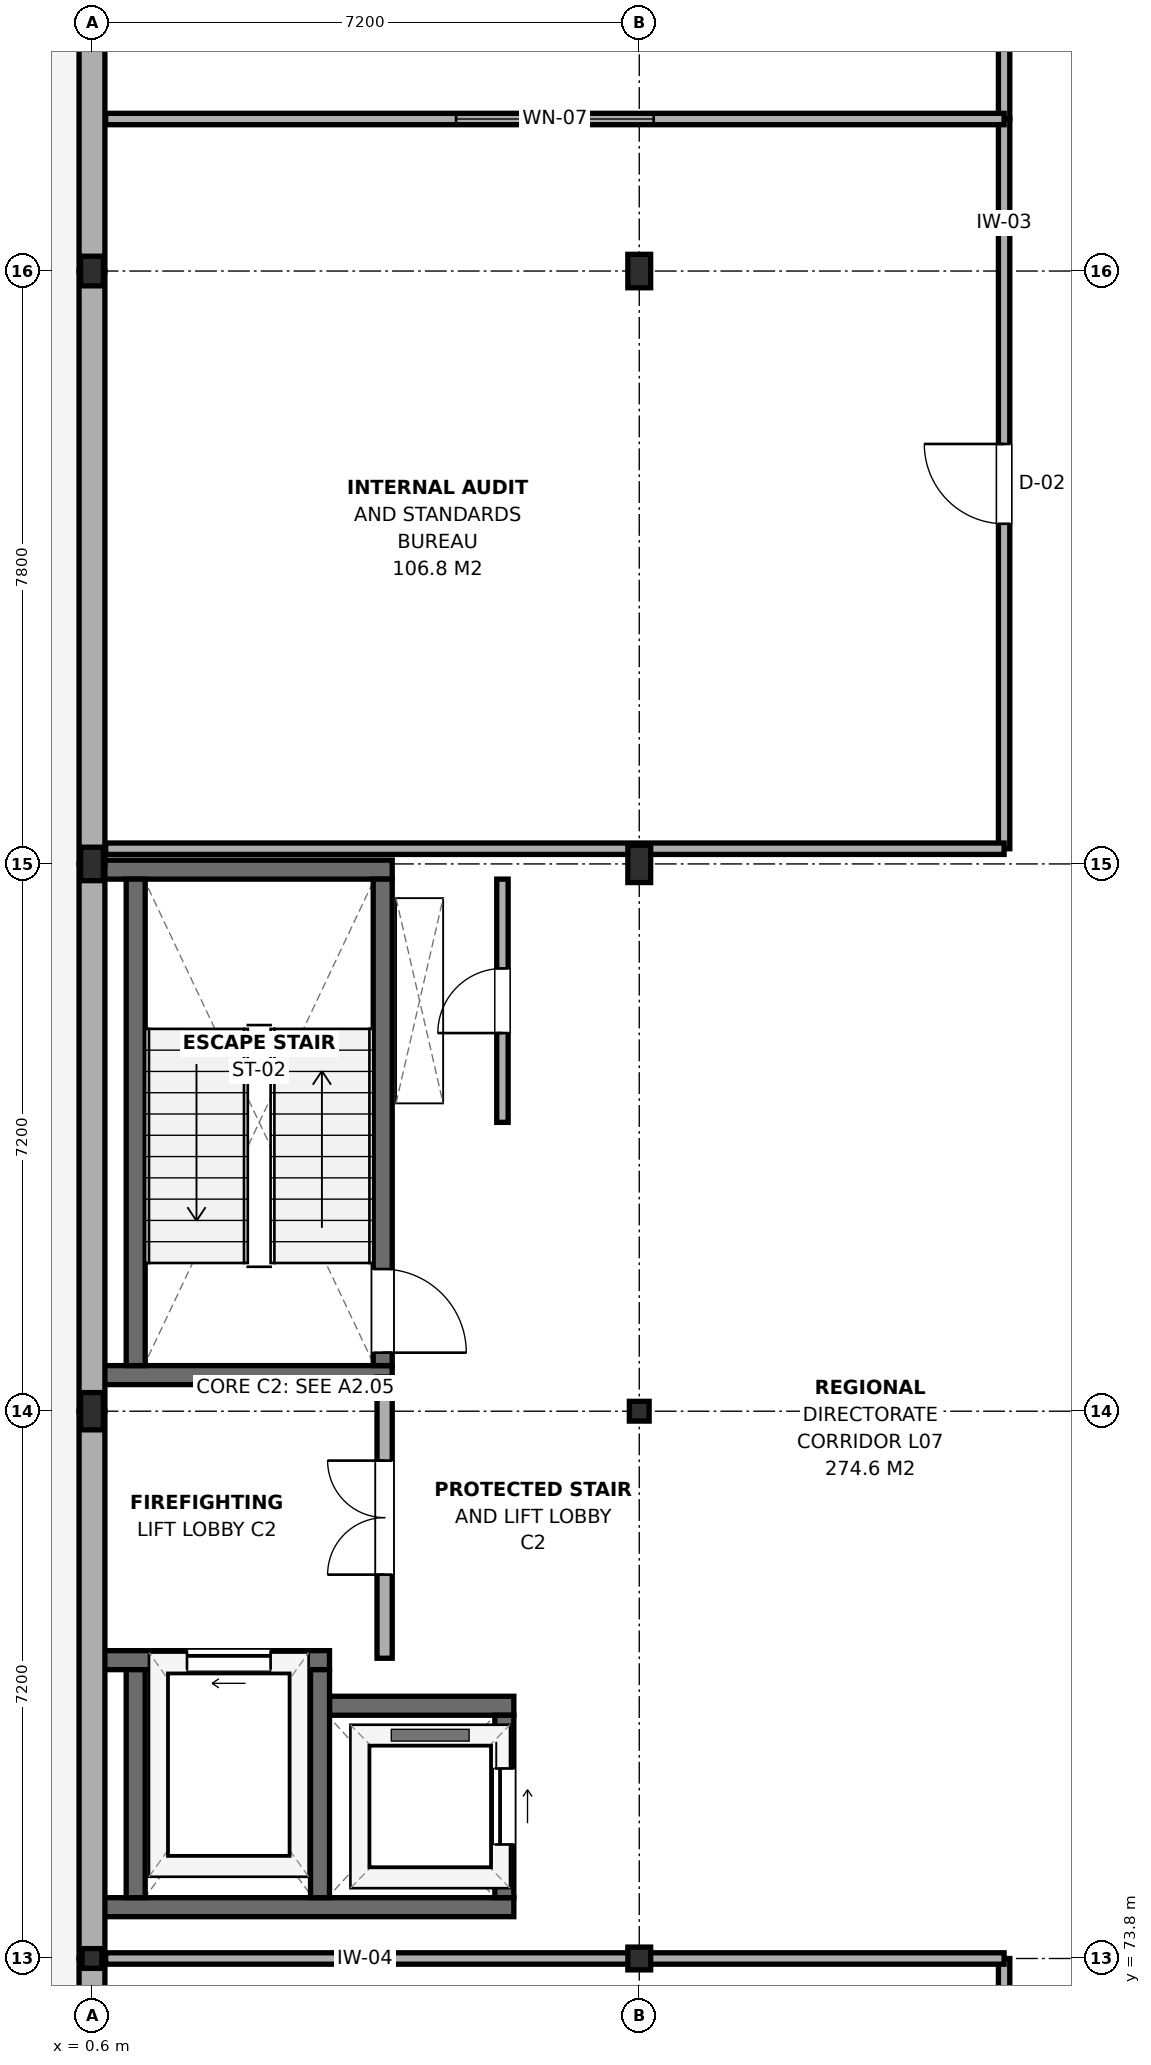
"""IFC4 building model, lengths in metres.
Left out: names, types, materials, properties, quantities, classifications, styles, units other than length and angle.
Written with IfcOpenShell. Run it as: python <this file> out.ifc"""

import sys

from ifc_helpers import new_model, si_unit, direction, frame, frame_2d, origin, origin_2d, place, context, subcontext, project, spatial, rectangle, i_section, extrude, element, fill, save


model = new_model("IFC4")
c1 = context("Model", 3, precision=1e-05, world=origin(), true_north=direction((0.0, 1.0)))
c2 = subcontext(c1, "Body", "Model", "MODEL_VIEW")
j1 = project(units=[si_unit("LENGTHUNIT", "METRE"), si_unit("PLANEANGLEUNIT", "RADIAN")], contexts=[c1])
p1 = place(None, origin())
s1 = spatial("IfcSite", under=j1, at=p1, CompositionType="ELEMENT")
p2 = place(p1, origin())
s2 = spatial("IfcBuilding", under=s1, at=p2, CompositionType="ELEMENT")
p3 = place(p2, frame((0.0, 0.0, 28.8)))
s3 = spatial("IfcBuildingStorey", under=s2, at=p3, CompositionType="ELEMENT", Elevation=28.8)
p4 = place(p3, frame((0.6, 73.8, 0.0), z_axis=(0.0, 0.0, 1.0), x_axis=(1.0, 0.0, 0.0)))
e1 = element("IfcColumn", 1, at=p4, inside=s3, PredefinedType="COLUMN", context=c2, shape_type="SweptSolid", body=[
    extrude(i_section(OverallWidth=0.26, OverallDepth=0.26, WebThickness=0.01, FlangeThickness=0.018, FilletRadius=0.024, at=origin_2d()), origin(), (0.0, 0.0, 1.0), 3.9),
])
p5 = place(p3, frame((0.6, 81.0, 0.0), z_axis=(0.0, 0.0, 1.0), x_axis=(1.0, 0.0, 0.0)))
e2 = element("IfcColumn", 2, at=p5, inside=s3, PredefinedType="COLUMN", context=c2, shape_type="SweptSolid", body=[
    extrude(i_section(OverallWidth=0.3, OverallDepth=0.49, WebThickness=0.012, FlangeThickness=0.023, FilletRadius=0.027, at=origin_2d()), origin(), (0.0, 0.0, 1.0), 3.9),
])
p6 = place(p3, frame((0.6, 88.2, 0.0), z_axis=(0.0, 0.0, 1.0), x_axis=(1.0, 0.0, 0.0)))
e3 = element("IfcColumn", 3, at=p6, inside=s3, PredefinedType="COLUMN", context=c2, shape_type="SweptSolid", body=[
    extrude(i_section(OverallWidth=0.3, OverallDepth=0.44, WebThickness=0.011, FlangeThickness=0.021, FilletRadius=0.027, at=origin_2d()), origin(), (0.0, 0.0, 1.0), 3.9),
])
p7 = place(p3, frame((0.6, 96.0, 0.0), z_axis=(0.0, 0.0, 1.0), x_axis=(1.0, 0.0, 0.0)))
e4 = element("IfcColumn", 4, at=p7, inside=s3, PredefinedType="COLUMN", context=c2, shape_type="SweptSolid", body=[
    extrude(i_section(OverallWidth=0.3, OverallDepth=0.39, WebThickness=0.011, FlangeThickness=0.019, FilletRadius=0.027, at=origin_2d()), origin(), (0.0, 0.0, 1.0), 3.9),
])
p8 = place(p3, frame((7.8, 73.8, 0.0), z_axis=(0.0, 0.0, 1.0), x_axis=(1.0, 0.0, 0.0)))
e5 = element("IfcColumn", 5, at=p8, inside=s3, PredefinedType="COLUMN", context=c2, shape_type="SweptSolid", body=[
    extrude(i_section(OverallWidth=0.3, OverallDepth=0.3, WebThickness=0.011, FlangeThickness=0.019, FilletRadius=0.027, at=origin_2d()), origin(), (0.0, 0.0, 1.0), 3.9),
])
p9 = place(p3, frame((7.8, 81.0, 0.0), z_axis=(0.0, 0.0, 1.0), x_axis=(1.0, 0.0, 0.0)))
e6 = element("IfcColumn", 6, at=p9, inside=s3, PredefinedType="COLUMN", context=c2, shape_type="SweptSolid", body=[
    extrude(i_section(OverallWidth=0.26, OverallDepth=0.26, WebThickness=0.01, FlangeThickness=0.018, FilletRadius=0.024, at=origin_2d()), origin(), (0.0, 0.0, 1.0), 3.9),
])
p10 = place(p3, frame((7.8, 88.2, 0.0), z_axis=(0.0, 0.0, 1.0), x_axis=(1.0, 0.0, 0.0)))
e7 = element("IfcColumn", 7, at=p10, inside=s3, PredefinedType="COLUMN", context=c2, shape_type="SweptSolid", body=[
    extrude(i_section(OverallWidth=0.3, OverallDepth=0.49, WebThickness=0.012, FlangeThickness=0.023, FilletRadius=0.027, at=origin_2d()), origin(), (0.0, 0.0, 1.0), 3.9),
])
p11 = place(p3, frame((7.8, 96.0, 0.0), z_axis=(0.0, 0.0, 1.0), x_axis=(1.0, 0.0, 0.0)))
e8 = element("IfcColumn", 8, at=p11, inside=s3, PredefinedType="COLUMN", context=c2, shape_type="SweptSolid", body=[
    extrude(i_section(OverallWidth=0.3, OverallDepth=0.44, WebThickness=0.011, FlangeThickness=0.021, FilletRadius=0.027, at=origin_2d()), origin(), (0.0, 0.0, 1.0), 3.9),
])
for number, where, z_axis, x_axis in (
    (9, (0.75, 81.475, 0.0), (0.0, 0.0, 1.0), (1.0, 0.0, 0.0)),
    (10, (0.75, 88.125, 0.0), (0.0, 0.0, 1.0), (1.0, 0.0, 0.0)),
):
    element("IfcWall", number, at=place(p3, frame(where, z_axis=z_axis, x_axis=x_axis)), inside=s3, PredefinedType="SHEAR", context=c2, shape_type="SweptSolid", body=[
        extrude(rectangle(XDim=3.8, YDim=0.25, at=frame_2d((1.9, 0.0))), origin(), (0.0, 0.0, 1.0), 3.72),
    ])
p12 = place(p3, frame((1.175, 81.6, 0.0), z_axis=(0.0, 0.0, 1.0), x_axis=(0.0, 1.0, 0.0)))
e11 = element("IfcWall", 11, at=p12, inside=s3, PredefinedType="SHEAR", context=c2, shape_type="SweptSolid", body=[
    extrude(rectangle(XDim=6.4, YDim=0.25, at=frame_2d((3.2, 0.0))), origin(), (0.0, 0.0, 1.0), 3.72),
])
p13 = place(p3, frame((4.425, 81.6, 0.0), z_axis=(0.0, 0.0, 1.0), x_axis=(0.0, 1.0, 0.0)))
e12 = element("IfcWall", 12, at=p13, inside=s3, PredefinedType="SHEAR", context=c2, shape_type="SweptSolid", body=[
    extrude(rectangle(XDim=6.4, YDim=0.25, at=frame_2d((3.2, 0.0))), origin(), (0.0, 0.0, 1.0), 3.72),
])
p14 = place(p13, frame((0.17, 0.0, 0.0)))
e13 = element("IfcOpeningElement", 13, at=p14, cuts=e12, PredefinedType="OPENING", context=c2, shape_type="SweptSolid", body=[
    extrude(rectangle(XDim=1.1, YDim=2.15, at=frame_2d((0.55, 1.075))), frame((0.0, 0.14, 0.0), z_axis=(0.0, -1.0, 0.0), x_axis=(1.0, 0.0, 0.0)), (0.0, 0.0, 1.0), 0.28),
])
p15 = place(p3, frame((0.75, 74.475, 0.0), z_axis=(0.0, 0.0, 1.0), x_axis=(1.0, 0.0, 0.0)))
e14 = element("IfcWall", 14, at=p15, inside=s3, PredefinedType="SHEAR", context=c2, shape_type="SweptSolid", body=[
    extrude(rectangle(XDim=5.4, YDim=0.25, at=frame_2d((2.7, 0.0))), origin(), (0.0, 0.0, 1.0), 3.72),
])
p16 = place(p3, frame((0.75, 77.725, 0.0), z_axis=(0.0, 0.0, 1.0), x_axis=(1.0, 0.0, 0.0)))
e15 = element("IfcWall", 15, at=p16, inside=s3, PredefinedType="SHEAR", context=c2, shape_type="SweptSolid", body=[
    extrude(rectangle(XDim=2.975, YDim=0.25, at=frame_2d((1.488, 0.0))), origin(), (0.0, 0.0, 1.0), 3.72),
])
p17 = place(p16, frame((1.1, 0.0, 0.0)))
e16 = element("IfcOpeningElement", 16, at=p17, cuts=e15, PredefinedType="OPENING", context=c2, shape_type="SweptSolid", body=[
    extrude(rectangle(XDim=1.1, YDim=2.15, at=frame_2d((0.55, 1.075))), frame((0.0, 0.14, 0.0), z_axis=(0.0, -1.0, 0.0), x_axis=(1.0, 0.0, 0.0)), (0.0, 0.0, 1.0), 0.28),
])
p18 = place(p3, frame((3.725, 77.125, 0.0), z_axis=(0.0, 0.0, 1.0), x_axis=(1.0, 0.0, 0.0)))
e17 = element("IfcWall", 17, at=p18, inside=s3, PredefinedType="SHEAR", context=c2, shape_type="SweptSolid", body=[
    extrude(rectangle(XDim=2.425, YDim=0.25, at=frame_2d((1.212, 0.0))), origin(), (0.0, 0.0, 1.0), 3.72),
])
for number, where, z_axis, x_axis in (
    (18, (1.175, 74.6, 0.0), (0.0, 0.0, 1.0), (0.0, 1.0, 0.0)),
    (19, (3.6, 74.6, 0.0), (0.0, 0.0, 1.0), (0.0, 1.0, 0.0)),
):
    element("IfcWall", number, at=place(p3, frame(where, z_axis=z_axis, x_axis=x_axis)), inside=s3, PredefinedType="SHEAR", context=c2, shape_type="SweptSolid", body=[
        extrude(rectangle(XDim=3.0, YDim=0.25, at=frame_2d((1.5, 0.0))), origin(), (0.0, 0.0, 1.0), 3.72),
    ])
p19 = place(p3, frame((6.025, 74.6, 0.0), z_axis=(0.0, 0.0, 1.0), x_axis=(0.0, 1.0, 0.0)))
e20 = element("IfcWall", 20, at=p19, inside=s3, PredefinedType="SHEAR", context=c2, shape_type="SweptSolid", body=[
    extrude(rectangle(XDim=2.4, YDim=0.25, at=frame_2d((1.2, 0.0))), origin(), (0.0, 0.0, 1.0), 3.72),
])
p20 = place(p19, frame((0.7, 0.0, 0.0)))
e21 = element("IfcOpeningElement", 21, at=p20, cuts=e20, PredefinedType="OPENING", context=c2, shape_type="SweptSolid", body=[
    extrude(rectangle(XDim=1.0, YDim=2.15, at=frame_2d((0.5, 1.075))), frame((0.0, 0.14, 0.0), z_axis=(0.0, -1.0, 0.0), x_axis=(1.0, 0.0, 0.0)), (0.0, 0.0, 1.0), 0.28),
])
p21 = place(p3, frame((0.6, 66.6, 0.0), z_axis=(0.0, 0.0, 1.0), x_axis=(0.0, 1.0, 0.0)))
e22 = element("IfcWall", 22, at=p21, inside=s3, PredefinedType="SOLIDWALL", context=c2, shape_type="SweptSolid", body=[
    extrude(rectangle(XDim=7.2, YDim=0.34, at=frame_2d((3.6, 0.0))), origin(), (0.0, 0.0, 1.0), 3.115),
])
p22 = place(p21, frame((2.6, 0.0, 0.9)))
e23 = element("IfcOpeningElement", 23, at=p22, cuts=e22, PredefinedType="OPENING", context=c2, shape_type="SweptSolid", body=[
    extrude(rectangle(XDim=2.0, YDim=1.8, at=frame_2d((1.0, 0.9))), frame((0.0, 0.185, 0.0), z_axis=(0.0, -1.0, 0.0), x_axis=(1.0, 0.0, 0.0)), (0.0, 0.0, 1.0), 0.37),
])
for number, where, z_axis, x_axis in (
    (24, (0.6, 73.8, 0.0), (0.0, 0.0, 1.0), (0.0, 1.0, 0.0)),
    (25, (0.6, 81.0, 0.0), (0.0, 0.0, 1.0), (0.0, 1.0, 0.0)),
):
    element("IfcWall", number, at=place(p3, frame(where, z_axis=z_axis, x_axis=x_axis)), inside=s3, PredefinedType="SOLIDWALL", context=c2, shape_type="SweptSolid", body=[
        extrude(rectangle(XDim=7.2, YDim=0.34, at=frame_2d((3.6, 0.0))), origin(), (0.0, 0.0, 1.0), 3.115),
    ])
p23 = place(p3, frame((0.6, 88.2, 0.0), z_axis=(0.0, 0.0, 1.0), x_axis=(0.0, 1.0, 0.0)))
e26 = element("IfcWall", 26, at=p23, inside=s3, PredefinedType="SOLIDWALL", context=c2, shape_type="SweptSolid", body=[
    extrude(rectangle(XDim=7.8, YDim=0.34, at=frame_2d((3.9, 0.0))), origin(), (0.0, 0.0, 1.0), 3.165),
])
p24 = place(p3, frame((0.6, 96.0, 0.0), z_axis=(0.0, 0.0, 1.0), x_axis=(0.0, 1.0, 0.0)))
e27 = element("IfcWall", 27, at=p24, inside=s3, PredefinedType="SOLIDWALL", context=c2, shape_type="SweptSolid", body=[
    extrude(rectangle(XDim=8.57, YDim=0.34, at=frame_2d((4.285, 0.0))), origin(), (0.0, 0.0, 1.0), 3.215),
])
p25 = place(p3, frame((4.45, 77.75, 0.0), z_axis=(0.0, 0.0, 1.0), x_axis=(0.0, 1.0, 0.0)))
e28 = element("IfcWall", 28, at=p25, inside=s3, PredefinedType="PARTITIONING", context=c2, shape_type="SweptSolid", body=[
    extrude(rectangle(XDim=3.7, YDim=0.2, at=frame_2d((1.85, 0.0))), origin(), (0.0, 0.0, 1.0), 3.265),
])
p26 = place(p25, frame((1.1, 0.0, 0.0)))
e29 = element("IfcOpeningElement", 29, at=p26, cuts=e28, PredefinedType="OPENING", context=c2, shape_type="SweptSolid", body=[
    extrude(rectangle(XDim=1.5, YDim=2.15, at=frame_2d((0.75, 1.075))), frame((0.0, 0.115, 0.0), z_axis=(0.0, -1.0, 0.0), x_axis=(1.0, 0.0, 0.0)), (0.0, 0.0, 1.0), 0.23),
])
p27 = place(p3, frame((6.0, 84.8, 0.0), z_axis=(0.0, 0.0, 1.0), x_axis=(0.0, 1.0, 0.0)))
e30 = element("IfcWall", 30, at=p27, inside=s3, PredefinedType="PARTITIONING", context=c2, shape_type="SweptSolid", body=[
    extrude(rectangle(XDim=3.2, YDim=0.15, at=frame_2d((1.6, 0.0))), origin(), (0.0, 0.0, 1.0), 3.115),
])
p28 = place(p27, frame((1.175, 0.0, 0.0)))
e31 = element("IfcOpeningElement", 31, at=p28, cuts=e30, PredefinedType="OPENING", context=c2, shape_type="SweptSolid", body=[
    extrude(rectangle(XDim=0.85, YDim=2.1, at=frame_2d((0.425, 1.05))), frame((0.0, 0.09, 0.0), z_axis=(0.0, -1.0, 0.0), x_axis=(1.0, 0.0, 0.0)), (0.0, 0.0, 1.0), 0.18),
])
p29 = place(p3, frame((12.6, 58.8, 0.0), z_axis=(0.0, 0.0, 1.0), x_axis=(0.0, 1.0, 0.0)))
e32 = element("IfcWall", 32, at=p29, inside=s3, PredefinedType="PARTITIONING", context=c2, shape_type="SweptSolid", body=[
    extrude(rectangle(XDim=15.0, YDim=0.15, at=frame_2d((7.5, 0.0))), origin(), (0.0, 0.0, 1.0), 3.165),
])
p30 = place(p29, frame((7.0, 0.0, 0.0)))
e33 = element("IfcOpeningElement", 33, at=p30, cuts=e32, PredefinedType="OPENING", context=c2, shape_type="SweptSolid", body=[
    extrude(rectangle(XDim=1.0, YDim=2.15, at=frame_2d((0.5, 1.075))), frame((0.0, 0.09, 0.0), z_axis=(0.0, -1.0, 0.0), x_axis=(1.0, 0.0, 0.0)), (0.0, 0.0, 1.0), 0.18),
])
p31 = place(p29, frame((9.5, 0.0, 0.95)))
e34 = element("IfcOpeningElement", 34, at=p31, cuts=e32, PredefinedType="OPENING", context=c2, shape_type="SweptSolid", body=[
    extrude(rectangle(XDim=2.6, YDim=1.5, at=frame_2d((1.3, 0.75))), frame((0.0, 0.09, 0.0), z_axis=(0.0, -1.0, 0.0), x_axis=(1.0, 0.0, 0.0)), (0.0, 0.0, 1.0), 0.18),
])
p32 = place(p3, frame((0.78, 73.8, 0.0), z_axis=(0.0, 0.0, 1.0), x_axis=(1.0, 0.0, 0.0)))
e35 = element("IfcWall", 35, at=p32, inside=s3, PredefinedType="PARTITIONING", context=c2, shape_type="SweptSolid", body=[
    extrude(rectangle(XDim=11.82, YDim=0.15, at=frame_2d((5.91, 0.0))), origin(), (0.0, 0.0, 1.0), 3.115),
])
p33 = place(p3, frame((12.6, 88.4, 0.0), z_axis=(0.0, 0.0, 1.0), x_axis=(0.0, 1.0, 0.0)))
e36 = element("IfcWall", 36, at=p33, inside=s3, PredefinedType="PARTITIONING", context=c2, shape_type="SweptSolid", body=[
    extrude(rectangle(XDim=9.6, YDim=0.15, at=frame_2d((4.8, 0.0))), origin(), (0.0, 0.0, 1.0), 3.165),
])
p34 = place(p33, frame((4.275, 0.0, 0.0)))
e37 = element("IfcOpeningElement", 37, at=p34, cuts=e36, PredefinedType="OPENING", context=c2, shape_type="SweptSolid", body=[
    extrude(rectangle(XDim=1.05, YDim=2.15, at=frame_2d((0.525, 1.075))), frame((0.0, 0.09, 0.0), z_axis=(0.0, -1.0, 0.0), x_axis=(1.0, 0.0, 0.0)), (0.0, 0.0, 1.0), 0.18),
])
p35 = place(p3, frame((0.78, 88.4, 0.0), z_axis=(0.0, 0.0, 1.0), x_axis=(1.0, 0.0, 0.0)))
e38 = element("IfcWall", 38, at=p35, inside=s3, PredefinedType="PARTITIONING", context=c2, shape_type="SweptSolid", body=[
    extrude(rectangle(XDim=11.82, YDim=0.15, at=frame_2d((5.91, 0.0))), origin(), (0.0, 0.0, 1.0), 3.115),
])
p36 = place(p3, frame((12.6, 98.0, 0.0), z_axis=(0.0, 0.0, 1.0), x_axis=(0.0, 1.0, 0.0)))
e39 = element("IfcWall", 39, at=p36, inside=s3, PredefinedType="PARTITIONING", context=c2, shape_type="SweptSolid", body=[
    extrude(rectangle(XDim=4.04, YDim=0.15, at=frame_2d((2.02, 0.0))), origin(), (0.0, 0.0, 1.0), 3.415),
])
p37 = place(p36, frame((1.545, 0.0, 0.0)))
e40 = element("IfcOpeningElement", 40, at=p37, cuts=e39, PredefinedType="OPENING", context=c2, shape_type="SweptSolid", body=[
    extrude(rectangle(XDim=0.95, YDim=2.15, at=frame_2d((0.475, 1.075))), frame((0.0, 0.09, 0.0), z_axis=(0.0, -1.0, 0.0), x_axis=(1.0, 0.0, 0.0)), (0.0, 0.0, 1.0), 0.18),
])
p38 = place(p3, frame((0.78, 98.0, 0.0), z_axis=(0.0, 0.0, 1.0), x_axis=(1.0, 0.0, 0.0)))
e41 = element("IfcWall", 41, at=p38, inside=s3, PredefinedType="PARTITIONING", context=c2, shape_type="SweptSolid", body=[
    extrude(rectangle(XDim=11.82, YDim=0.15, at=frame_2d((5.91, 0.0))), origin(), (0.0, 0.0, 1.0), 3.125),
])
p39 = place(p38, frame((4.61, 0.0, 0.95)))
e42 = element("IfcOpeningElement", 42, at=p39, cuts=e41, PredefinedType="OPENING", context=c2, shape_type="SweptSolid", body=[
    extrude(rectangle(XDim=2.6, YDim=1.5, at=frame_2d((1.3, 0.75))), frame((0.0, 0.09, 0.0), z_axis=(0.0, -1.0, 0.0), x_axis=(1.0, 0.0, 0.0)), (0.0, 0.0, 1.0), 0.18),
])
p40 = place(p14, frame((1.1, 0.0, 0.0), z_axis=(0.0, 0.0, 1.0), x_axis=(-1.0, 0.0, 0.0)))
e43 = element("IfcDoor", 43, at=p40, inside=s3, OperationType="SINGLE_SWING_RIGHT", PredefinedType="DOOR", context=c2, shape_type="SweptSolid", body=[
    extrude(rectangle(XDim=1.1, YDim=2.15, at=frame_2d((0.55, 1.075))), frame((0.0, 0.025, 0.0), z_axis=(0.0, -1.0, 0.0), x_axis=(1.0, 0.0, 0.0)), (0.0, 0.0, 1.0), 0.05),
])
fill(e13, e43)
p41 = place(p17, origin())
e44 = element("IfcDoor", 44, at=p41, inside=s3, OperationType="SLIDING_TO_LEFT", PredefinedType="DOOR", context=c2, shape_type="SweptSolid", body=[
    extrude(rectangle(XDim=1.1, YDim=2.15, at=frame_2d((0.55, 1.075))), frame((0.0, 0.025, 0.0), z_axis=(0.0, -1.0, 0.0), x_axis=(1.0, 0.0, 0.0)), (0.0, 0.0, 1.0), 0.05),
])
fill(e16, e44)
p42 = place(p20, frame((1.0, 0.0, 0.0), z_axis=(0.0, 0.0, 1.0), x_axis=(-1.0, 0.0, 0.0)))
e45 = element("IfcDoor", 45, at=p42, inside=s3, OperationType="SLIDING_TO_RIGHT", PredefinedType="DOOR", context=c2, shape_type="SweptSolid", body=[
    extrude(rectangle(XDim=1.0, YDim=2.15, at=frame_2d((0.5, 1.075))), frame((0.0, 0.025, 0.0), z_axis=(0.0, -1.0, 0.0), x_axis=(1.0, 0.0, 0.0)), (0.0, 0.0, 1.0), 0.05),
])
fill(e21, e45)
p43 = place(p26, origin())
e46 = element("IfcDoor", 46, at=p43, inside=s3, OperationType="DOUBLE_DOOR_SINGLE_SWING", PredefinedType="DOOR", context=c2, shape_type="SweptSolid", body=[
    extrude(rectangle(XDim=1.5, YDim=2.15, at=frame_2d((0.75, 1.075))), frame((0.0, 0.025, 0.0), z_axis=(0.0, -1.0, 0.0), x_axis=(1.0, 0.0, 0.0)), (0.0, 0.0, 1.0), 0.05),
])
fill(e29, e46)
p44 = place(p28, origin())
e47 = element("IfcDoor", 47, at=p44, inside=s3, OperationType="SINGLE_SWING_LEFT", PredefinedType="DOOR", context=c2, shape_type="SweptSolid", body=[
    extrude(rectangle(XDim=0.85, YDim=2.1, at=frame_2d((0.425, 1.05))), frame((0.0, 0.025, 0.0), z_axis=(0.0, -1.0, 0.0), x_axis=(1.0, 0.0, 0.0)), (0.0, 0.0, 1.0), 0.05),
])
fill(e31, e47)
p45 = place(p34, origin())
e48 = element("IfcDoor", 48, at=p45, inside=s3, OperationType="SINGLE_SWING_RIGHT", PredefinedType="DOOR", context=c2, shape_type="SweptSolid", body=[
    extrude(rectangle(XDim=1.05, YDim=2.15, at=frame_2d((0.525, 1.075))), frame((0.0, 0.025, 0.0), z_axis=(0.0, -1.0, 0.0), x_axis=(1.0, 0.0, 0.0)), (0.0, 0.0, 1.0), 0.05),
])
fill(e37, e48)
p46 = place(p39, origin())
e49 = element("IfcWindow", 49, at=p46, inside=s3, PartitioningType="SINGLE_PANEL", PredefinedType="WINDOW", context=c2, shape_type="SweptSolid", body=[
    extrude(rectangle(XDim=2.6, YDim=1.5, at=frame_2d((1.3, 0.75))), frame((0.0, 0.03, 0.0), z_axis=(0.0, -1.0, 0.0), x_axis=(1.0, 0.0, 0.0)), (0.0, 0.0, 1.0), 0.06),
])
fill(e42, e49)
save(model, sys.argv[1])
